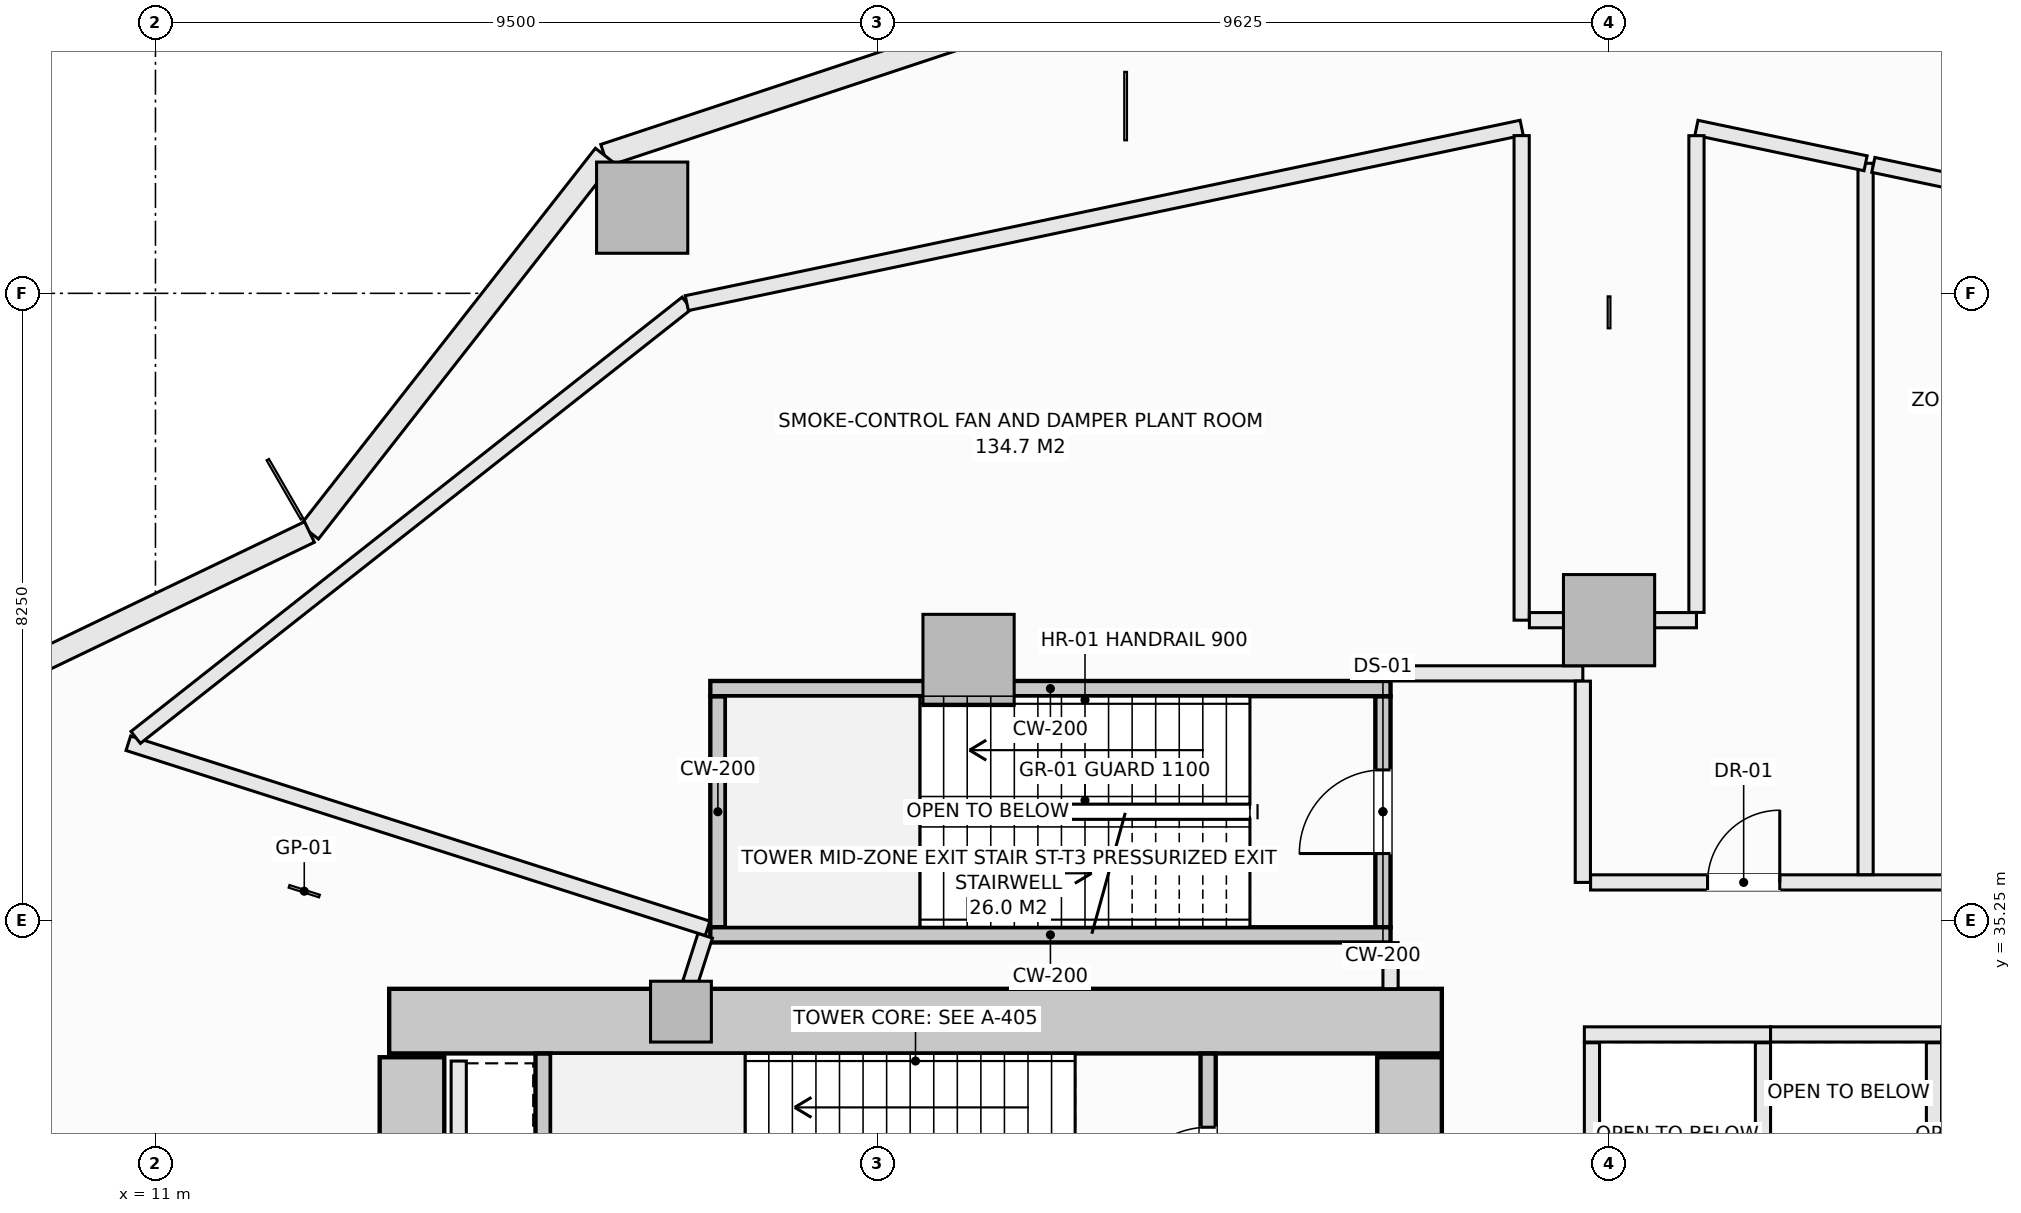
"""IFC4 building model, lengths in metres.
Left out: names, types, materials, properties, quantities, classifications, styles, units other than length and angle.
Written with IfcOpenShell. Run it as: python <this file> out.ifc"""

import sys

from ifc_helpers import new_model, si_unit, direction, frame, frame_2d, origin, origin_2d, place, context, subcontext, project, spatial, rectangle, extrude, element, fill, save


model = new_model("IFC4")
c1 = context("Model", 3, precision=1e-05, world=origin(), true_north=direction((0.0, 1.0)))
c2 = subcontext(c1, "Body", "Model", "MODEL_VIEW")
j1 = project(units=[si_unit("LENGTHUNIT", "METRE"), si_unit("PLANEANGLEUNIT", "RADIAN")], contexts=[c1])
p1 = place(None, origin())
s1 = spatial("IfcSite", under=j1, at=p1, CompositionType="ELEMENT")
p2 = place(p1, origin())
s2 = spatial("IfcBuilding", under=s1, at=p2, CompositionType="ELEMENT")
p3 = place(p2, frame((0.0, 0.0, 95.8)))
s3 = spatial("IfcBuildingStorey", under=s2, at=p3, CompositionType="ELEMENT", Elevation=95.8)
p4 = place(p3, frame((14.075, 33.925, -0.32), z_axis=(0.0, 0.0, 1.0), x_axis=(1.0, 0.0, 0.0)))
e1 = element("IfcWall", 1, at=p4, inside=s3, PredefinedType="SHEAR", context=c2, shape_type="SweptSolid", body=[
    extrude(rectangle(XDim=13.85, YDim=0.85, at=frame_2d((6.925, 0.0))), origin(), (0.0, 0.0, 1.0), 5.04),
])
p5 = place(p3, frame((14.375, 20.55, -0.32), z_axis=(0.0, 0.0, 1.0), x_axis=(0.0, 1.0, 0.0)))
e2 = element("IfcWall", 2, at=p5, inside=s3, PredefinedType="SHEAR", context=c2, shape_type="SweptSolid", body=[
    extrude(rectangle(XDim=12.9, YDim=0.85, at=frame_2d((6.45, 0.0))), origin(), (0.0, 0.0, 1.0), 5.04),
])
p6 = place(p3, frame((27.5, 31.95, -0.32), z_axis=(0.0, 0.0, 1.0), x_axis=(0.0, 1.0, 0.0)))
e3 = element("IfcWall", 3, at=p6, inside=s3, PredefinedType="SHEAR", context=c2, shape_type="SweptSolid", body=[
    extrude(rectangle(XDim=1.5, YDim=0.85, at=frame_2d((0.75, 0.0))), origin(), (0.0, 0.0, 1.0), 5.04),
])
for number, where, z_axis, x_axis in (
    (4, (17.404, 44.627, -0.32), (0.0, 0.0, 1.0), (1.0, 0.0, 0.0)),
    (5, (30.125, 39.2, -0.32), (0.0, 0.0, 1.0), (1.0, 0.0, 0.0)),
    (6, (21.698, 38.677, -0.32), (0.0, 0.0, 1.0), (1.0, 0.0, 0.0)),
):
    element("IfcColumn", number, at=place(p3, frame(where, z_axis=z_axis, x_axis=x_axis)), inside=s3, PredefinedType="COLUMN", context=c2, shape_type="SweptSolid", body=[
        extrude(rectangle(XDim=1.2, YDim=1.2, at=origin_2d()), origin(), (0.0, 0.0, 1.0), 5.04),
    ])
p7 = place(p3, frame((17.914, 34.05, -0.32), z_axis=(0.0, 0.0, 1.0), x_axis=(1.0, 0.0, 0.0)))
e7 = element("IfcColumn", 7, at=p7, inside=s3, PredefinedType="PILASTER", context=c2, shape_type="SweptSolid", body=[
    extrude(rectangle(XDim=0.8, YDim=0.8, at=origin_2d()), origin(), (0.0, 0.0, 1.0), 5.04),
])
p8 = place(p3, frame((16.906, 45.316, 0.0), z_axis=(0.0, 0.0, 1.0), x_axis=(0.949245153629, 0.314537181127, 0.0)))
e8 = element("IfcWall", 8, at=p8, inside=s3, PredefinedType="SOLIDWALL", context=c2, shape_type="SweptSolid", body=[
    extrude(rectangle(XDim=6.717, YDim=0.3, at=frame_2d((3.358, 0.0))), origin(), (0.0, 0.0, 1.0), 1.15),
])
p9 = place(p3, frame((13.026, 40.36, 0.0), z_axis=(0.0, 0.0, 1.0), x_axis=(0.616434798832, 0.78740595552, 0.0)))
e9 = element("IfcWall", 9, at=p9, inside=s3, PredefinedType="SOLIDWALL", context=c2, shape_type="SweptSolid", body=[
    extrude(rectangle(XDim=6.294, YDim=0.3, at=frame_2d((3.147, 0.0))), origin(), (0.0, 0.0, 1.0), 1.15),
])
p10 = place(p3, frame((7.229, 37.575, 0.0), z_axis=(0.0, 0.0, 1.0), x_axis=(0.901354747727, 0.433081538224, 0.0)))
e10 = element("IfcWall", 10, at=p10, inside=s3, PredefinedType="SOLIDWALL", context=c2, shape_type="SweptSolid", body=[
    extrude(rectangle(XDim=6.431, YDim=0.3, at=frame_2d((3.215, 0.0))), origin(), (0.0, 0.0, 1.0), 1.15),
])
p11 = place(p3, frame((24.85, 30.46, -0.32), z_axis=(0.0, 0.0, 1.0), x_axis=(0.0, 1.0, 0.0)))
e11 = element("IfcWall", 11, at=p11, inside=s3, PredefinedType="SHEAR", context=c2, shape_type="SweptSolid", body=[
    extrude(rectangle(XDim=3.038, YDim=0.2, at=frame_2d((1.519, 0.0))), origin(), (0.0, 0.0, 1.0), 5.04),
])
p12 = place(p11, frame((0.969, 0.0, 0.32)))
e12 = element("IfcOpeningElement", 12, at=p12, cuts=e11, PredefinedType="OPENING", context=c2, shape_type="SweptSolid", body=[
    extrude(rectangle(XDim=1.1, YDim=2.15, at=frame_2d((0.55, 1.075))), frame((0.0, 0.11, 0.0), z_axis=(0.0, -1.0, 0.0), x_axis=(1.0, 0.0, 0.0)), (0.0, 0.0, 1.0), 0.22),
])
p13 = place(p3, frame((16.1, 30.462, -0.32), z_axis=(0.0, 0.0, 1.0), x_axis=(0.0, 1.0, 0.0)))
e13 = element("IfcWall", 13, at=p13, inside=s3, PredefinedType="SHEAR", context=c2, shape_type="SweptSolid", body=[
    extrude(rectangle(XDim=3.036, YDim=0.2, at=frame_2d((1.518, 0.0))), origin(), (0.0, 0.0, 1.0), 5.04),
])
p14 = place(p3, frame((27.15, 35.16, -0.32), z_axis=(0.0, 0.0, 1.0), x_axis=(0.0, 1.0, 0.0)))
e14 = element("IfcWall", 14, at=p14, inside=s3, PredefinedType="SHEAR", context=c2, shape_type="SweptSolid", body=[
    extrude(rectangle(XDim=3.04, YDim=0.2, at=frame_2d((1.52, 0.0))), origin(), (0.0, 0.0, 1.0), 5.04),
])
p15 = place(p14, frame((0.97, 0.0, 0.32)))
e15 = element("IfcOpeningElement", 15, at=p15, cuts=e14, PredefinedType="OPENING", context=c2, shape_type="SweptSolid", body=[
    extrude(rectangle(XDim=1.1, YDim=2.15, at=frame_2d((0.55, 1.075))), frame((0.0, 0.11, 0.0), z_axis=(0.0, -1.0, 0.0), x_axis=(1.0, 0.0, 0.0)), (0.0, 0.0, 1.0), 0.22),
])
p16 = place(p3, frame((18.4, 35.16, -0.32), z_axis=(0.0, 0.0, 1.0), x_axis=(0.0, 1.0, 0.0)))
e16 = element("IfcWall", 16, at=p16, inside=s3, PredefinedType="SHEAR", context=c2, shape_type="SweptSolid", body=[
    extrude(rectangle(XDim=3.04, YDim=0.2, at=frame_2d((1.52, 0.0))), origin(), (0.0, 0.0, 1.0), 5.04),
])
for number, where, z_axis, x_axis in (
    (17, (18.3, 38.3, -0.32), (0.0, 0.0, 1.0), (1.0, 0.0, 0.0)),
    (18, (18.3, 35.06, -0.32), (0.0, 0.0, 1.0), (1.0, 0.0, 0.0)),
):
    element("IfcWall", number, at=place(p3, frame(where, z_axis=z_axis, x_axis=x_axis)), inside=s3, PredefinedType="SHEAR", context=c2, shape_type="SweptSolid", body=[
        extrude(rectangle(XDim=8.95, YDim=0.2, at=frame_2d((4.475, 0.0))), origin(), (0.0, 0.0, 1.0), 5.04),
    ])
p17 = place(p3, frame((29.8, 33.75, 0.0), z_axis=(0.0, 0.0, 1.0), x_axis=(1.0, 0.0, 0.0)))
e19 = element("IfcWall", 19, at=p17, inside=s3, PredefinedType="SOLIDWALL", context=c2, shape_type="SweptSolid", body=[
    extrude(rectangle(XDim=2.45, YDim=0.2, at=frame_2d((1.225, 0.0))), origin(), (0.0, 0.0, 1.0), 4.72),
])
for number, where, z_axis, x_axis in (
    (20, (29.9, 31.21, 0.0), (0.0, 0.0, 1.0), (0.0, 1.0, 0.0)),
    (21, (32.15, 31.21, 0.0), (0.0, 0.0, 1.0), (0.0, 1.0, 0.0)),
):
    element("IfcWall", number, at=place(p3, frame(where, z_axis=z_axis, x_axis=x_axis)), inside=s3, PredefinedType="SOLIDWALL", context=c2, shape_type="SweptSolid", body=[
        extrude(rectangle(XDim=2.43, YDim=0.2, at=frame_2d((1.215, 0.0))), origin(), (0.0, 0.0, 1.0), 4.72),
    ])
p18 = place(p3, frame((32.25, 33.75, 0.0), z_axis=(0.0, 0.0, 1.0), x_axis=(1.0, 0.0, 0.0)))
e22 = element("IfcWall", 22, at=p18, inside=s3, PredefinedType="SOLIDWALL", context=c2, shape_type="SweptSolid", body=[
    extrude(rectangle(XDim=2.25, YDim=0.2, at=frame_2d((1.125, 0.0))), origin(), (0.0, 0.0, 1.0), 4.72),
])
p19 = place(p3, frame((34.4, 31.21, 0.0), z_axis=(0.0, 0.0, 1.0), x_axis=(0.0, 1.0, 0.0)))
e23 = element("IfcWall", 23, at=p19, inside=s3, PredefinedType="SOLIDWALL", context=c2, shape_type="SweptSolid", body=[
    extrude(rectangle(XDim=2.43, YDim=0.2, at=frame_2d((1.215, 0.0))), origin(), (0.0, 0.0, 1.0), 4.72),
])
p20 = place(p3, frame((14.99, 30.55, 0.0), z_axis=(0.0, 0.0, 1.0), x_axis=(0.0, 1.0, 0.0)))
e24 = element("IfcWall", 24, at=p20, inside=s3, PredefinedType="SOLIDWALL", context=c2, shape_type="SweptSolid", body=[
    extrude(rectangle(XDim=2.85, YDim=0.2, at=frame_2d((1.425, 0.0))), origin(), (0.0, 0.0, 1.0), 4.72),
])
p21 = place(p3, frame((27.25, 34.352, 0.0), z_axis=(0.0, 0.0, 1.0), x_axis=(0.0, 1.0, 0.0)))
e25 = element("IfcWall", 25, at=p21, inside=s3, PredefinedType="SOLIDWALL", context=c2, shape_type="SweptSolid", body=[
    extrude(rectangle(XDim=0.606, YDim=0.2, at=frame_2d((0.303, 0.0))), origin(), (0.0, 0.0, 1.0), 4.72),
])
p22 = place(p3, frame((27.25, 38.5, 0.0), z_axis=(0.0, 0.0, 1.0), x_axis=(1.0, 0.0, 0.0)))
e26 = element("IfcWall", 26, at=p22, inside=s3, PredefinedType="SOLIDWALL", context=c2, shape_type="SweptSolid", body=[
    extrude(rectangle(XDim=2.53, YDim=0.2, at=frame_2d((1.265, 0.0))), origin(), (0.0, 0.0, 1.0), 4.72),
])
p23 = place(p3, frame((29.78, 35.75, 0.0), z_axis=(0.0, 0.0, 1.0), x_axis=(0.0, 1.0, 0.0)))
e27 = element("IfcWall", 27, at=p23, inside=s3, PredefinedType="SOLIDWALL", context=c2, shape_type="SweptSolid", body=[
    extrude(rectangle(XDim=2.648, YDim=0.2, at=frame_2d((1.324, 0.0))), origin(), (0.0, 0.0, 1.0), 4.72),
])
p24 = place(p3, frame((29.882, 35.75, 0.0), z_axis=(0.0, 0.0, 1.0), x_axis=(1.0, 0.0, 0.0)))
e28 = element("IfcWall", 28, at=p24, inside=s3, PredefinedType="SOLIDWALL", context=c2, shape_type="SweptSolid", body=[
    extrude(rectangle(XDim=8.816, YDim=0.2, at=frame_2d((4.408, 0.0))), origin(), (0.0, 0.0, 1.0), 4.084),
])
p25 = place(p24, frame((5.537, 0.0, 0.0)))
e29 = element("IfcOpeningElement", 29, at=p25, cuts=e28, PredefinedType="OPENING", context=c2, shape_type="SweptSolid", body=[
    extrude(rectangle(XDim=0.95, YDim=2.1, at=frame_2d((0.475, 1.05))), frame((0.0, 0.11, 0.0), z_axis=(0.0, -1.0, 0.0), x_axis=(1.0, 0.0, 0.0)), (0.0, 0.0, 1.0), 0.22),
])
p26 = place(p24, frame((1.539, 0.0, 0.0)))
e30 = element("IfcOpeningElement", 30, at=p26, cuts=e28, PredefinedType="OPENING", context=c2, shape_type="SweptSolid", body=[
    extrude(rectangle(XDim=0.95, YDim=2.1, at=frame_2d((0.475, 1.05))), frame((0.0, 0.11, 0.0), z_axis=(0.0, -1.0, 0.0), x_axis=(1.0, 0.0, 0.0)), (0.0, 0.0, 1.0), 0.22),
])
p27 = place(p3, frame((33.5, 35.852, 0.0), z_axis=(0.0, 0.0, 1.0), x_axis=(0.0, 1.0, 0.0)))
e31 = element("IfcWall", 31, at=p27, inside=s3, PredefinedType="SOLIDWALL", context=c2, shape_type="SweptSolid", body=[
    extrude(rectangle(XDim=9.359, YDim=0.2, at=frame_2d((4.679, 0.0))), origin(), (0.0, 0.0, 1.0), 4.72),
])
p28 = place(p3, frame((31.275, 45.678, 0.0), z_axis=(0.0, 0.0, 1.0), x_axis=(0.978630598051, -0.205626244818, 0.0)))
e32 = element("IfcWall", 32, at=p28, inside=s3, PredefinedType="SOLIDWALL", context=c2, shape_type="SweptSolid", body=[
    extrude(rectangle(XDim=2.274, YDim=0.2, at=frame_2d((1.137, 0.0))), origin(), (0.0, 0.0, 1.0), 4.72),
])
p29 = place(p3, frame((33.602, 45.19, 0.0), z_axis=(0.0, 0.0, 1.0), x_axis=(0.978638616513, -0.205588079102, 0.0)))
e33 = element("IfcWall", 33, at=p29, inside=s3, PredefinedType="SOLIDWALL", context=c2, shape_type="SweptSolid", body=[
    extrude(rectangle(XDim=7.195, YDim=0.2, at=frame_2d((3.598, 0.0))), origin(), (0.0, 0.0, 1.0), 4.72),
])
p30 = place(p3, frame((10.643, 37.581, 0.0), z_axis=(0.0, 0.0, 1.0), x_axis=(0.952519763544, -0.304476764397, 0.0)))
e34 = element("IfcWall", 34, at=p30, inside=s3, PredefinedType="SOLIDWALL", context=c2, shape_type="SweptSolid", body=[
    extrude(rectangle(XDim=8.001, YDim=0.2, at=frame_2d((4.0, 0.0))), origin(), (0.0, 0.0, 1.0), 4.72),
])
p31 = place(p3, frame((10.74, 37.657, 0.0), z_axis=(0.0, 0.0, 1.0), x_axis=(0.785450376932, 0.618924636266, 0.0)))
e35 = element("IfcWall", 35, at=p31, inside=s3, PredefinedType="SOLIDWALL", context=c2, shape_type="SweptSolid", body=[
    extrude(rectangle(XDim=9.232, YDim=0.2, at=frame_2d((4.616, 0.0))), origin(), (0.0, 0.0, 1.0), 4.72),
])
p32 = place(p3, frame((17.991, 43.371, 0.0), z_axis=(0.0, 0.0, 1.0), x_axis=(0.978632097897, 0.20561910652, 0.0)))
e36 = element("IfcWall", 36, at=p32, inside=s3, PredefinedType="SOLIDWALL", context=c2, shape_type="SweptSolid", body=[
    extrude(rectangle(XDim=11.224, YDim=0.2, at=frame_2d((5.612, 0.0))), origin(), (0.0, 0.0, 1.0), 4.72),
])
p33 = place(p3, frame((28.975, 39.2, 0.0), z_axis=(0.0, 0.0, 1.0), x_axis=(0.0, 1.0, 0.0)))
e37 = element("IfcWall", 37, at=p33, inside=s3, PredefinedType="SOLIDWALL", context=c2, shape_type="SweptSolid", body=[
    extrude(rectangle(XDim=6.375, YDim=0.2, at=frame_2d((3.188, 0.0))), origin(), (0.0, 0.0, 1.0), 4.72),
])
p34 = place(p3, frame((29.077, 39.2, 0.0), z_axis=(0.0, 0.0, 1.0), x_axis=(1.0, 0.0, 0.0)))
e38 = element("IfcWall", 38, at=p34, inside=s3, PredefinedType="SOLIDWALL", context=c2, shape_type="SweptSolid", body=[
    extrude(rectangle(XDim=2.198, YDim=0.2, at=frame_2d((1.099, 0.0))), origin(), (0.0, 0.0, 1.0), 4.084),
])
p35 = place(p3, frame((31.275, 39.302, 0.0), z_axis=(0.0, 0.0, 1.0), x_axis=(0.0, 1.0, 0.0)))
e39 = element("IfcWall", 39, at=p35, inside=s3, PredefinedType="SOLIDWALL", context=c2, shape_type="SweptSolid", body=[
    extrude(rectangle(XDim=6.272, YDim=0.2, at=frame_2d((3.136, 0.0))), origin(), (0.0, 0.0, 1.0), 4.72),
])
p36 = place(p3, frame((18.01, 34.352, 0.0), z_axis=(0.0, 0.0, 1.0), x_axis=(0.304472538645, 0.952521114312, 0.0)))
e40 = element("IfcWall", 40, at=p36, inside=s3, PredefinedType="SOLIDWALL", context=c2, shape_type="SweptSolid", body=[
    extrude(rectangle(XDim=0.73, YDim=0.2, at=frame_2d((0.365, 0.0))), origin(), (0.0, 0.0, 1.0), 4.72),
])
p37 = place(p12, origin())
e41 = element("IfcDoor", 41, at=p37, inside=s3, OperationType="SINGLE_SWING_LEFT", PredefinedType="DOOR", context=c2, shape_type="SweptSolid", body=[
    extrude(rectangle(XDim=1.1, YDim=2.15, at=frame_2d((0.55, 1.075))), frame((0.0, 0.025, 0.0), z_axis=(0.0, -1.0, 0.0), x_axis=(1.0, 0.0, 0.0)), (0.0, 0.0, 1.0), 0.05),
])
fill(e12, e41)
p38 = place(p15, origin())
e42 = element("IfcDoor", 42, at=p38, inside=s3, OperationType="SINGLE_SWING_LEFT", PredefinedType="DOOR", context=c2, shape_type="SweptSolid", body=[
    extrude(rectangle(XDim=1.1, YDim=2.15, at=frame_2d((0.55, 1.075))), frame((0.0, 0.025, 0.0), z_axis=(0.0, -1.0, 0.0), x_axis=(1.0, 0.0, 0.0)), (0.0, 0.0, 1.0), 0.05),
])
fill(e15, e42)
p39 = place(p26, origin())
e43 = element("IfcDoor", 43, at=p39, inside=s3, OperationType="SINGLE_SWING_RIGHT", PredefinedType="DOOR", context=c2, shape_type="SweptSolid", body=[
    extrude(rectangle(XDim=0.95, YDim=2.1, at=frame_2d((0.475, 1.05))), frame((0.0, 0.025, 0.0), z_axis=(0.0, -1.0, 0.0), x_axis=(1.0, 0.0, 0.0)), (0.0, 0.0, 1.0), 0.05),
])
fill(e30, e43)
save(model, sys.argv[1])
